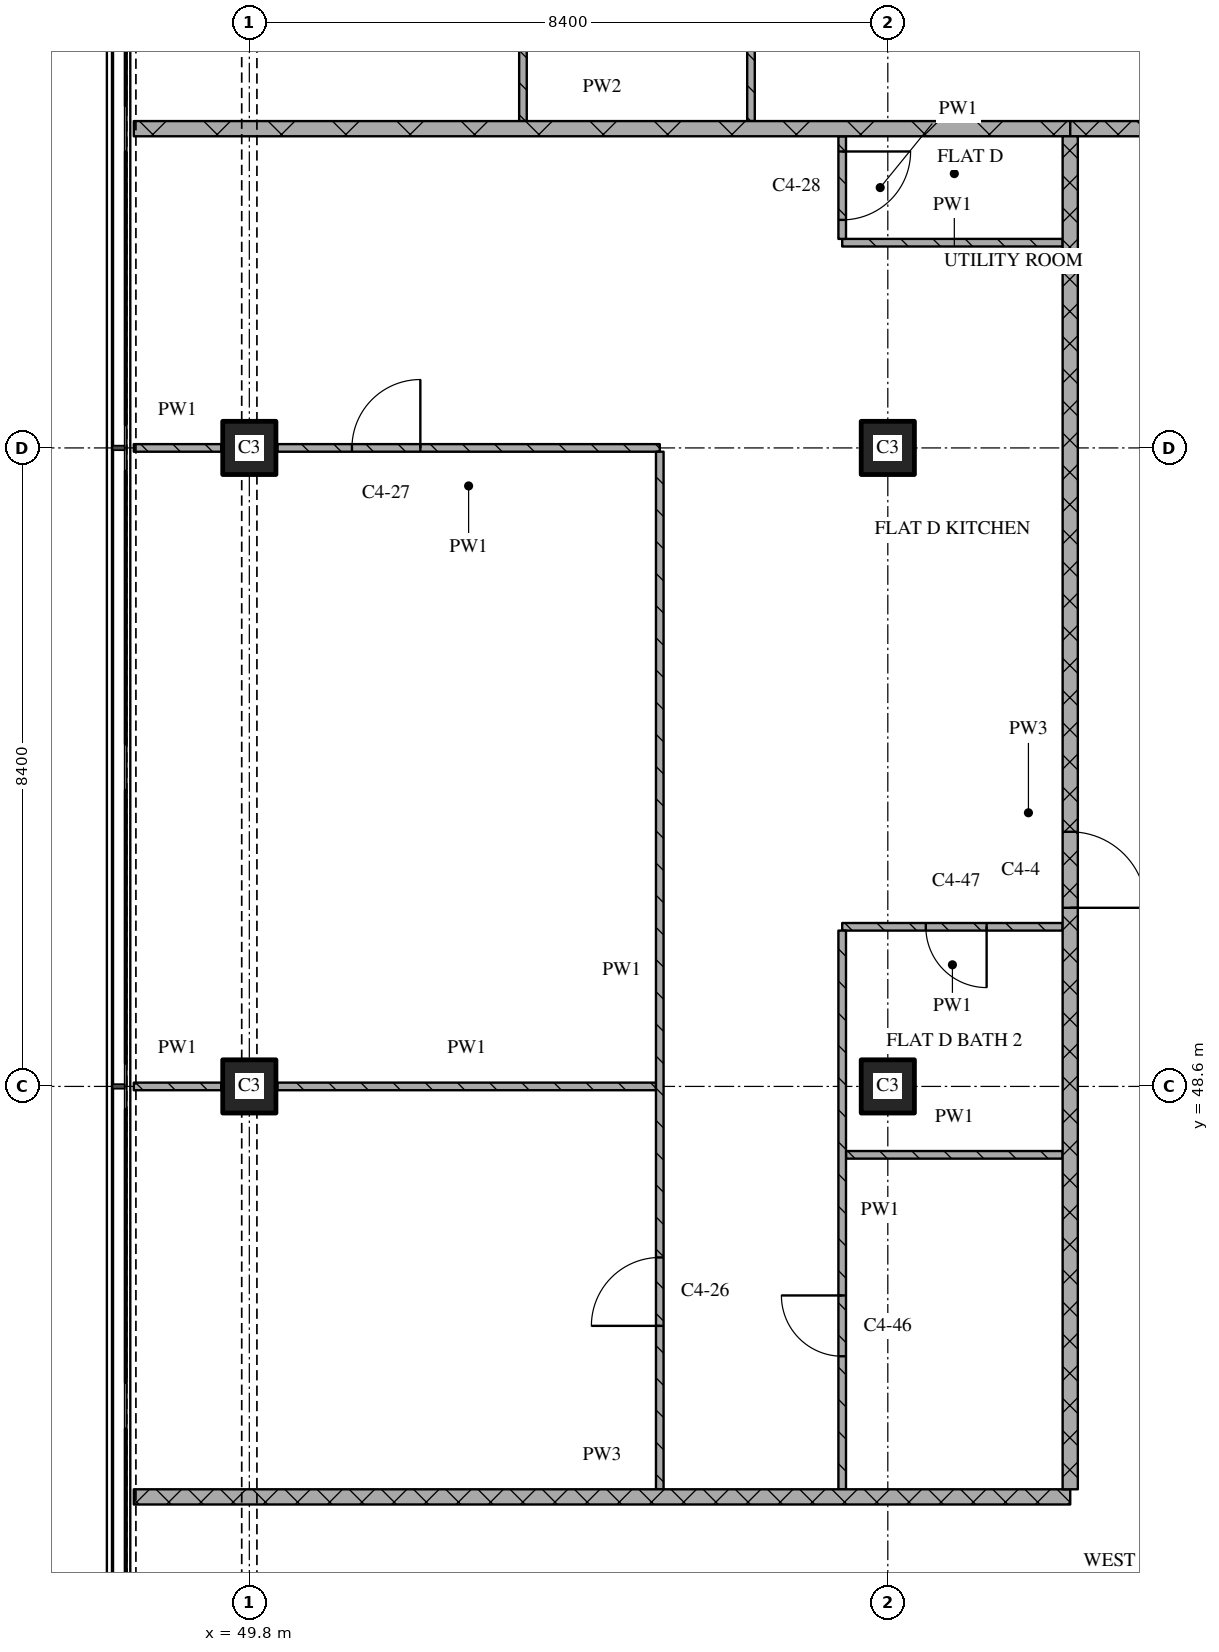
"""IFC4 building model, lengths in metres.
Left out: names, types, materials, properties, quantities, classifications, styles, units other than length and angle.
Written with IfcOpenShell. Run it as: python <this file> out.ifc"""

import sys

from ifc_helpers import new_model, si_unit, direction, frame, frame_2d, origin, origin_2d, place, context, subcontext, project, spatial, rectangle, extrude, element, fill, save


model = new_model("IFC4")
c1 = context("Model", 3, precision=1e-05, world=origin(), true_north=direction((0.0, 1.0)))
c2 = subcontext(c1, "Body", "Model", "MODEL_VIEW")
j1 = project(units=[si_unit("LENGTHUNIT", "METRE"), si_unit("PLANEANGLEUNIT", "RADIAN")], contexts=[c1])
p1 = place(None, origin())
s1 = spatial("IfcSite", under=j1, at=p1, CompositionType="ELEMENT")
p2 = place(p1, origin())
s2 = spatial("IfcBuilding", under=s1, at=p2, CompositionType="ELEMENT")
p3 = place(p2, frame((0.0, 0.0, 187.05)))
s3 = spatial("IfcBuildingStorey", under=s2, at=p3, CompositionType="ELEMENT", Elevation=187.05)
for number, where, z_axis, x_axis in (
    (1, (49.8, 48.6, 0.0), (0.0, 0.0, 1.0), (1.0, 0.0, 0.0)),
    (2, (49.8, 57.0, 0.0), (0.0, 0.0, 1.0), (1.0, 0.0, 0.0)),
    (3, (58.2, 48.6, 0.0), (0.0, 0.0, 1.0), (1.0, 0.0, 0.0)),
    (4, (58.2, 57.0, 0.0), (0.0, 0.0, 1.0), (1.0, 0.0, 0.0)),
):
    element("IfcColumn", number, at=place(p3, frame(where, z_axis=z_axis, x_axis=x_axis)), inside=s3, PredefinedType="COLUMN", context=c2, shape_type="SweptSolid", body=[
        extrude(rectangle(XDim=0.7, YDim=0.7, at=origin_2d()), origin(), (0.0, 0.0, 1.0), 3.6),
    ])
p4 = place(p3, frame((48.28, 43.2, 0.0), z_axis=(0.0, 0.0, 1.0), x_axis=(1.0, 0.0, 0.0)))
e5 = element("IfcWall", 5, at=p4, inside=s3, PredefinedType="PARTITIONING", context=c2, shape_type="SweptSolid", body=[
    extrude(rectangle(XDim=12.32, YDim=0.2, at=frame_2d((6.16, 0.0))), origin(), (0.0, 0.0, 1.0), 3.32),
])
p5 = place(p3, frame((57.65, 47.7, 0.0), z_axis=(0.0, 0.0, 1.0), x_axis=(1.0, 0.0, 0.0)))
e6 = element("IfcWall", 6, at=p5, inside=s3, PredefinedType="PARTITIONING", context=c2, shape_type="SweptSolid", body=[
    extrude(rectangle(XDim=2.85, YDim=0.1, at=frame_2d((1.425, 0.0))), origin(), (0.0, 0.0, 1.0), 3.32),
])
p6 = place(p3, frame((48.28, 48.6, 0.0), z_axis=(0.0, 0.0, 1.0), x_axis=(1.0, 0.0, 0.0)))
e7 = element("IfcWall", 7, at=p6, inside=s3, PredefinedType="PARTITIONING", context=c2, shape_type="SweptSolid", body=[
    extrude(rectangle(XDim=1.15, YDim=0.1, at=frame_2d((0.575, 0.0))), origin(), (0.0, 0.0, 1.0), 3.32),
])
p7 = place(p3, frame((50.17, 48.6, 0.0), z_axis=(0.0, 0.0, 1.0), x_axis=(1.0, 0.0, 0.0)))
e8 = element("IfcWall", 8, at=p7, inside=s3, PredefinedType="PARTITIONING", context=c2, shape_type="SweptSolid", body=[
    extrude(rectangle(XDim=4.98, YDim=0.1, at=frame_2d((2.49, 0.0))), origin(), (0.0, 0.0, 1.0), 3.32),
])
p8 = place(p3, frame((60.5, 50.7, 0.0), z_axis=(0.0, 0.0, 1.0), x_axis=(-1.0, 0.0, 0.0)))
e9 = element("IfcWall", 9, at=p8, inside=s3, PredefinedType="PARTITIONING", context=c2, shape_type="SweptSolid", body=[
    extrude(rectangle(XDim=2.9, YDim=0.1, at=frame_2d((1.45, 0.0))), origin(), (0.0, 0.0, 1.0), 3.32),
])
p9 = place(p8, frame((1.0, 0.0, 0.0)))
e10 = element("IfcOpeningElement", 10, at=p9, cuts=e9, PredefinedType="OPENING", context=c2, shape_type="SweptSolid", body=[
    extrude(rectangle(XDim=0.8, YDim=2.1, at=frame_2d((0.4, 1.05))), frame((0.0, 0.06, 0.0), z_axis=(0.0, -1.0, 0.0), x_axis=(1.0, 0.0, 0.0)), (0.0, 0.0, 1.0), 0.12),
])
p10 = place(p3, frame((48.28, 57.0, 0.0), z_axis=(0.0, 0.0, 1.0), x_axis=(1.0, 0.0, 0.0)))
e11 = element("IfcWall", 11, at=p10, inside=s3, PredefinedType="PARTITIONING", context=c2, shape_type="SweptSolid", body=[
    extrude(rectangle(XDim=1.15, YDim=0.1, at=frame_2d((0.575, 0.0))), origin(), (0.0, 0.0, 1.0), 3.32),
])
p11 = place(p3, frame((55.2, 57.0, 0.0), z_axis=(0.0, 0.0, 1.0), x_axis=(-1.0, 0.0, 0.0)))
e12 = element("IfcWall", 12, at=p11, inside=s3, PredefinedType="PARTITIONING", context=c2, shape_type="SweptSolid", body=[
    extrude(rectangle(XDim=5.03, YDim=0.1, at=frame_2d((2.515, 0.0))), origin(), (0.0, 0.0, 1.0), 3.32),
])
p12 = place(p11, frame((3.15, 0.0, 0.0)))
e13 = element("IfcOpeningElement", 13, at=p12, cuts=e12, PredefinedType="OPENING", context=c2, shape_type="SweptSolid", body=[
    extrude(rectangle(XDim=0.9, YDim=2.1, at=frame_2d((0.45, 1.05))), frame((0.0, 0.06, 0.0), z_axis=(0.0, -1.0, 0.0), x_axis=(1.0, 0.0, 0.0)), (0.0, 0.0, 1.0), 0.12),
])
p13 = place(p3, frame((57.6, 59.7, 0.0), z_axis=(0.0, 0.0, 1.0), x_axis=(1.0, 0.0, 0.0)))
e14 = element("IfcWall", 14, at=p13, inside=s3, PredefinedType="PARTITIONING", context=c2, shape_type="SweptSolid", body=[
    extrude(rectangle(XDim=2.9, YDim=0.1, at=frame_2d((1.45, 0.0))), origin(), (0.0, 0.0, 1.0), 3.32),
])
p14 = place(p3, frame((60.6, 61.2, 0.0), z_axis=(0.0, 0.0, 1.0), x_axis=(1.0, 0.0, 0.0)))
e15 = element("IfcWall", 15, at=p14, inside=s3, PredefinedType="PARTITIONING", context=c2, shape_type="SweptSolid", body=[
    extrude(rectangle(XDim=3.6, YDim=0.2, at=frame_2d((1.8, 0.0))), origin(), (0.0, 0.0, 1.0), 3.32),
])
p15 = place(p3, frame((48.28, 61.2, 0.0), z_axis=(0.0, 0.0, 1.0), x_axis=(1.0, 0.0, 0.0)))
e16 = element("IfcWall", 16, at=p15, inside=s3, PredefinedType="PARTITIONING", context=c2, shape_type="SweptSolid", body=[
    extrude(rectangle(XDim=12.32, YDim=0.2, at=frame_2d((6.16, 0.0))), origin(), (0.0, 0.0, 1.0), 3.32),
])
p16 = place(p3, frame((53.4, 65.35, 0.0), z_axis=(0.0, 0.0, 1.0), x_axis=(0.0, -1.0, 0.0)))
e17 = element("IfcWall", 17, at=p16, inside=s3, PredefinedType="PARTITIONING", context=c2, shape_type="SweptSolid", body=[
    extrude(rectangle(XDim=4.05, YDim=0.1, at=frame_2d((2.025, 0.0))), origin(), (0.0, 0.0, 1.0), 3.32),
])
p17 = place(p3, frame((55.2, 43.3, 0.0), z_axis=(0.0, 0.0, 1.0), x_axis=(0.0, 1.0, 0.0)))
e18 = element("IfcWall", 18, at=p17, inside=s3, PredefinedType="PARTITIONING", context=c2, shape_type="SweptSolid", body=[
    extrude(rectangle(XDim=13.65, YDim=0.1, at=frame_2d((6.825, 0.0))), origin(), (0.0, 0.0, 1.0), 3.32),
])
p18 = place(p17, frame((2.15, 0.0, 0.0)))
e19 = element("IfcOpeningElement", 19, at=p18, cuts=e18, PredefinedType="OPENING", context=c2, shape_type="SweptSolid", body=[
    extrude(rectangle(XDim=0.9, YDim=2.1, at=frame_2d((0.45, 1.05))), frame((0.0, 0.06, 0.0), z_axis=(0.0, -1.0, 0.0), x_axis=(1.0, 0.0, 0.0)), (0.0, 0.0, 1.0), 0.12),
])
p19 = place(p3, frame((56.4, 64.45, 0.0), z_axis=(0.0, 0.0, 1.0), x_axis=(0.0, -1.0, 0.0)))
e20 = element("IfcWall", 20, at=p19, inside=s3, PredefinedType="PARTITIONING", context=c2, shape_type="SweptSolid", body=[
    extrude(rectangle(XDim=3.15, YDim=0.1, at=frame_2d((1.575, 0.0))), origin(), (0.0, 0.0, 1.0), 3.32),
])
p20 = place(p3, frame((57.6, 50.65, 0.0), z_axis=(0.0, 0.0, 1.0), x_axis=(0.0, -1.0, 0.0)))
e21 = element("IfcWall", 21, at=p20, inside=s3, PredefinedType="PARTITIONING", context=c2, shape_type="SweptSolid", body=[
    extrude(rectangle(XDim=7.35, YDim=0.1, at=frame_2d((3.675, 0.0))), origin(), (0.0, 0.0, 1.0), 3.32),
])
p21 = place(p20, frame((4.8, 0.0, 0.0)))
e22 = element("IfcOpeningElement", 22, at=p21, cuts=e21, PredefinedType="OPENING", context=c2, shape_type="SweptSolid", body=[
    extrude(rectangle(XDim=0.8, YDim=2.1, at=frame_2d((0.4, 1.05))), frame((0.0, 0.06, 0.0), z_axis=(0.0, -1.0, 0.0), x_axis=(1.0, 0.0, 0.0)), (0.0, 0.0, 1.0), 0.12),
])
p22 = place(p3, frame((57.6, 61.1, 0.0), z_axis=(0.0, 0.0, 1.0), x_axis=(0.0, -1.0, 0.0)))
e23 = element("IfcWall", 23, at=p22, inside=s3, PredefinedType="PARTITIONING", context=c2, shape_type="SweptSolid", body=[
    extrude(rectangle(XDim=1.35, YDim=0.1, at=frame_2d((0.675, 0.0))), origin(), (0.0, 0.0, 1.0), 3.32),
])
p23 = place(p22, frame((0.2, 0.0, 0.0)))
e24 = element("IfcOpeningElement", 24, at=p23, cuts=e23, PredefinedType="OPENING", context=c2, shape_type="SweptSolid", body=[
    extrude(rectangle(XDim=0.9, YDim=2.1, at=frame_2d((0.45, 1.05))), frame((0.0, 0.06, 0.0), z_axis=(0.0, -1.0, 0.0), x_axis=(1.0, 0.0, 0.0)), (0.0, 0.0, 1.0), 0.12),
])
p24 = place(p3, frame((60.6, 43.3, 0.0), z_axis=(0.0, 0.0, 1.0), x_axis=(0.0, 1.0, 0.0)))
e25 = element("IfcWall", 25, at=p24, inside=s3, PredefinedType="PARTITIONING", context=c2, shape_type="SweptSolid", body=[
    extrude(rectangle(XDim=17.8, YDim=0.2, at=frame_2d((8.9, 0.0))), origin(), (0.0, 0.0, 1.0), 3.32),
])
p25 = place(p24, frame((7.65, 0.0, 0.0)))
e26 = element("IfcOpeningElement", 26, at=p25, cuts=e25, PredefinedType="OPENING", context=c2, shape_type="SweptSolid", body=[
    extrude(rectangle(XDim=1.0, YDim=2.1, at=frame_2d((0.5, 1.05))), frame((0.0, 0.11, 0.0), z_axis=(0.0, -1.0, 0.0), x_axis=(1.0, 0.0, 0.0)), (0.0, 0.0, 1.0), 0.22),
])
p26 = place(p9, origin())
e27 = element("IfcDoor", 27, at=p26, inside=s3, OperationType="SINGLE_SWING_LEFT", PredefinedType="DOOR", context=c2, shape_type="SweptSolid", body=[
    extrude(rectangle(XDim=0.8, YDim=2.1, at=frame_2d((0.4, 1.05))), frame((0.0, 0.025, 0.0), z_axis=(0.0, -1.0, 0.0), x_axis=(1.0, 0.0, 0.0)), (0.0, 0.0, 1.0), 0.05),
])
fill(e10, e27)
p27 = place(p12, origin())
e28 = element("IfcDoor", 28, at=p27, inside=s3, OperationType="SINGLE_SWING_RIGHT", PredefinedType="DOOR", context=c2, shape_type="SweptSolid", body=[
    extrude(rectangle(XDim=0.9, YDim=2.1, at=frame_2d((0.45, 1.05))), frame((0.0, 0.025, 0.0), z_axis=(0.0, -1.0, 0.0), x_axis=(1.0, 0.0, 0.0)), (0.0, 0.0, 1.0), 0.05),
])
fill(e13, e28)
p28 = place(p18, origin())
e29 = element("IfcDoor", 29, at=p28, inside=s3, OperationType="SINGLE_SWING_LEFT", PredefinedType="DOOR", context=c2, shape_type="SweptSolid", body=[
    extrude(rectangle(XDim=0.9, YDim=2.1, at=frame_2d((0.45, 1.05))), frame((0.0, 0.025, 0.0), z_axis=(0.0, -1.0, 0.0), x_axis=(1.0, 0.0, 0.0)), (0.0, 0.0, 1.0), 0.05),
])
fill(e19, e29)
p29 = place(p21, origin())
e30 = element("IfcDoor", 30, at=p29, inside=s3, OperationType="SINGLE_SWING_RIGHT", PredefinedType="DOOR", context=c2, shape_type="SweptSolid", body=[
    extrude(rectangle(XDim=0.8, YDim=2.1, at=frame_2d((0.4, 1.05))), frame((0.0, 0.025, 0.0), z_axis=(0.0, -1.0, 0.0), x_axis=(1.0, 0.0, 0.0)), (0.0, 0.0, 1.0), 0.05),
])
fill(e22, e30)
p30 = place(p23, origin())
e31 = element("IfcDoor", 31, at=p30, inside=s3, OperationType="SINGLE_SWING_LEFT", PredefinedType="DOOR", context=c2, shape_type="SweptSolid", body=[
    extrude(rectangle(XDim=0.9, YDim=2.1, at=frame_2d((0.45, 1.05))), frame((0.0, 0.025, 0.0), z_axis=(0.0, -1.0, 0.0), x_axis=(1.0, 0.0, 0.0)), (0.0, 0.0, 1.0), 0.05),
])
fill(e24, e31)
p31 = place(p25, origin())
e32 = element("IfcDoor", 32, at=p31, inside=s3, OperationType="SINGLE_SWING_RIGHT", PredefinedType="DOOR", context=c2, shape_type="SweptSolid", body=[
    extrude(rectangle(XDim=1.0, YDim=2.1, at=frame_2d((0.5, 1.05))), frame((0.0, 0.025, 0.0), z_axis=(0.0, -1.0, 0.0), x_axis=(1.0, 0.0, 0.0)), (0.0, 0.0, 1.0), 0.05),
])
fill(e26, e32)
save(model, sys.argv[1])
